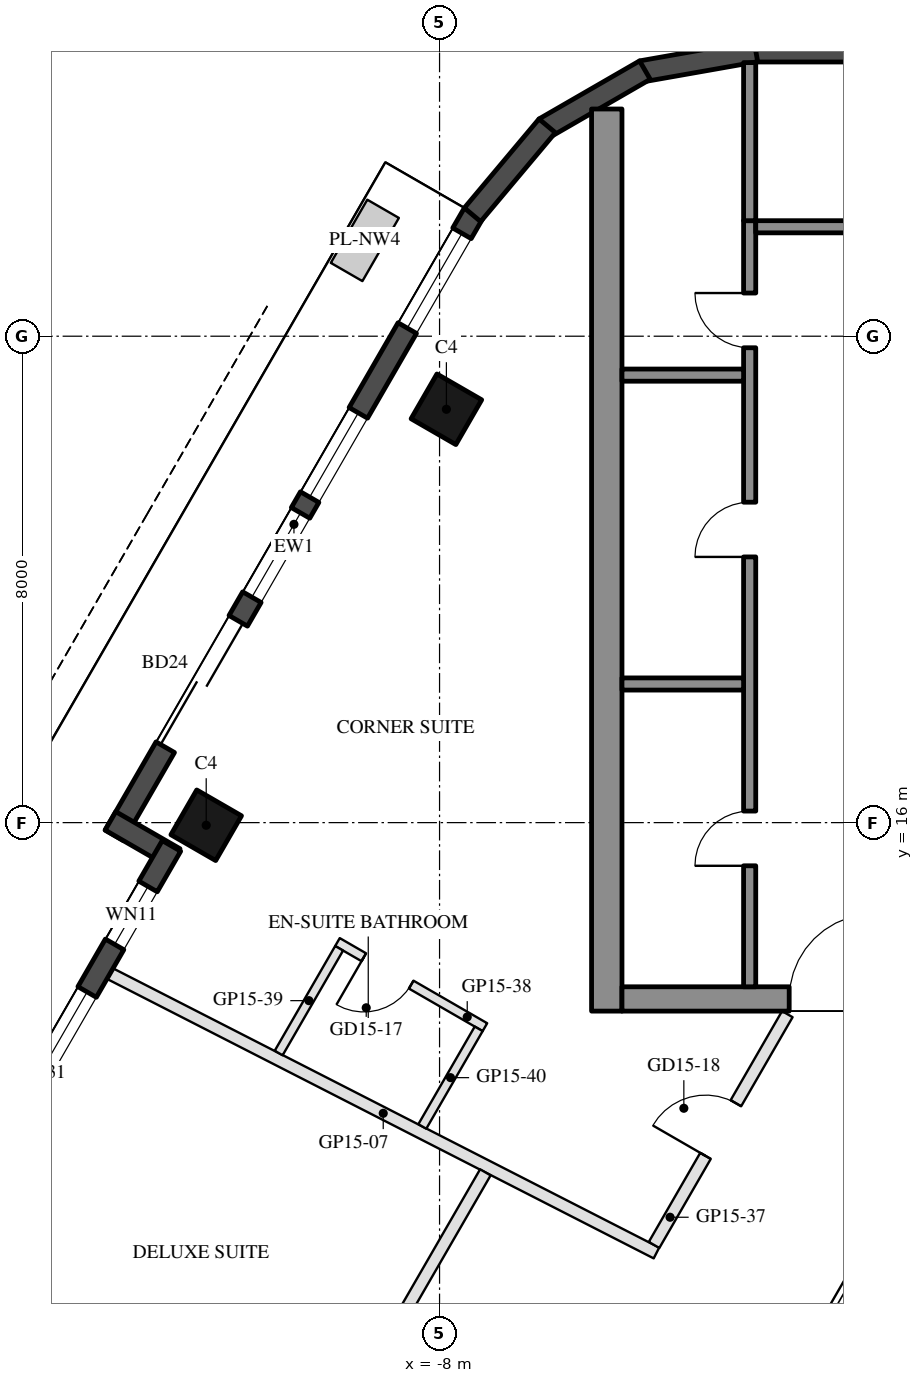
"""IFC4 building model, lengths in metres.
Left out: names, types, materials, properties, quantities, classifications, styles, units other than length and angle.
Written with IfcOpenShell. Run it as: python <this file> out.ifc"""

import sys

from ifc_helpers import new_model, si_unit, direction, frame, frame_2d, origin, origin_2d, place, context, subcontext, project, spatial, rectangle, hollow_rectangle, extrude, element, fill, save


model = new_model("IFC4")
c1 = context("Model", 3, precision=1e-05, world=origin(), true_north=direction((0.0, 1.0)))
c2 = subcontext(c1, "Body", "Model", "MODEL_VIEW")
j1 = project(units=[si_unit("LENGTHUNIT", "METRE"), si_unit("PLANEANGLEUNIT", "RADIAN")], contexts=[c1])
p1 = place(None, origin())
s1 = spatial("IfcSite", under=j1, at=p1, CompositionType="ELEMENT")
p2 = place(p1, origin())
s2 = spatial("IfcBuilding", under=s1, at=p2, CompositionType="ELEMENT")
p3 = place(p2, frame((0.0, 0.0, 172.5)))
s3 = spatial("IfcBuildingStorey", under=s2, at=p3, CompositionType="ELEMENT", Elevation=172.5)
for number, where, z_axis, x_axis in (
    (1, (-7.888, 22.798, 0.0), (0.0, 0.0, 1.0), (0.5, 0.866, 0.0)),
    (2, (-11.838, 15.957, 0.0), (0.0, 0.0, 1.0), (0.5, 0.866, 0.0)),
):
    element("IfcColumn", number, at=place(p3, frame(where, z_axis=z_axis, x_axis=x_axis)), inside=s3, PredefinedType="COLUMN", context=c2, shape_type="SweptSolid", body=[
        extrude(hollow_rectangle(XDim=0.85, YDim=0.85, WallThickness=0.04, at=origin_2d()), origin(), (0.0, 0.0, 1.0), 3.7),
    ])
p4 = place(p3, frame((-7.441, 26.022, 0.0), z_axis=(0.0, 0.0, 1.0), x_axis=(-0.499992533062, -0.86602971478, 0.0)))
e3 = element("IfcWall", 3, at=p4, inside=s3, PredefinedType="SOLIDWALL", context=c2, shape_type="SweptSolid", body=[
    extrude(rectangle(XDim=11.816, YDim=0.35, at=frame_2d((5.908, 0.0))), origin(), (0.0, 0.0, 1.0), 3.55),
])
p5 = place(p4, frame((0.381, 0.0, 0.3)))
e4 = element("IfcOpeningElement", 4, at=p5, cuts=e3, PredefinedType="OPENING", context=c2, shape_type="SweptSolid", body=[
    extrude(rectangle(XDim=1.8, YDim=2.65, at=frame_2d((0.9, 1.325))), frame((0.0, 0.185, 0.0), z_axis=(0.0, -1.0, 0.0), x_axis=(1.0, 0.0, 0.0)), (0.0, 0.0, 1.0), 0.37),
])
p6 = place(p4, frame((7.74, 0.0, 0.0)))
e5 = element("IfcOpeningElement", 5, at=p6, cuts=e3, PredefinedType="OPENING", context=c2, shape_type="SweptSolid", body=[
    extrude(rectangle(XDim=2.4, YDim=2.4, at=frame_2d((1.2, 1.2))), frame((0.0, 0.185, 0.0), z_axis=(0.0, -1.0, 0.0), x_axis=(1.0, 0.0, 0.0)), (0.0, 0.0, 1.0), 0.37),
])
p7 = place(p4, frame((3.791, 0.0, 0.3)))
e6 = element("IfcOpeningElement", 6, at=p7, cuts=e3, PredefinedType="OPENING", context=c2, shape_type="SweptSolid", body=[
    extrude(rectangle(XDim=1.6, YDim=2.65, at=frame_2d((0.8, 1.325))), frame((0.0, 0.185, 0.0), z_axis=(0.0, -1.0, 0.0), x_axis=(1.0, 0.0, 0.0)), (0.0, 0.0, 1.0), 0.37),
])
p8 = place(p4, frame((5.691, 0.0, 0.3)))
e7 = element("IfcOpeningElement", 7, at=p8, cuts=e3, PredefinedType="OPENING", context=c2, shape_type="SweptSolid", body=[
    extrude(rectangle(XDim=1.6, YDim=2.65, at=frame_2d((0.8, 1.325))), frame((0.0, 0.185, 0.0), z_axis=(0.0, -1.0, 0.0), x_axis=(1.0, 0.0, 0.0)), (0.0, 0.0, 1.0), 0.37),
])
p9 = place(p3, frame((-13.413, 16.029, 0.0), z_axis=(0.0, 0.0, 1.0), x_axis=(0.866005645448, -0.500034220881, 0.0)))
e8 = element("IfcWall", 8, at=p9, inside=s3, PredefinedType="SOLIDWALL", context=c2, shape_type="SweptSolid", body=[
    extrude(rectangle(XDim=1.22, YDim=0.35, at=frame_2d((0.61, 0.0))), origin(), (0.0, 0.0, 1.0), 3.55),
])
p10 = place(p3, frame((-12.409, 15.617, 0.0), z_axis=(0.0, 0.0, 1.0), x_axis=(-0.500003597184, -0.866023326939, 0.0)))
e9 = element("IfcWall", 9, at=p10, inside=s3, PredefinedType="SOLIDWALL", context=c2, shape_type="SweptSolid", body=[
    extrude(rectangle(XDim=6.74, YDim=0.35, at=frame_2d((3.37, 0.0))), origin(), (0.0, 0.0, 1.0), 3.55),
])
p11 = place(p10, frame((0.77, 0.0, 0.3)))
e10 = element("IfcOpeningElement", 10, at=p11, cuts=e9, PredefinedType="OPENING", context=c2, shape_type="SweptSolid", body=[
    extrude(rectangle(XDim=1.1, YDim=2.65, at=frame_2d((0.55, 1.325))), frame((0.0, 0.185, 0.0), z_axis=(0.0, -1.0, 0.0), x_axis=(1.0, 0.0, 0.0)), (0.0, 0.0, 1.0), 0.37),
])
p12 = place(p10, frame((2.774, 0.0, 0.3)))
e11 = element("IfcOpeningElement", 11, at=p12, cuts=e9, PredefinedType="OPENING", context=c2, shape_type="SweptSolid", body=[
    extrude(rectangle(XDim=3.1, YDim=2.65, at=frame_2d((1.55, 1.325))), frame((0.0, 0.185, 0.0), z_axis=(0.0, -1.0, 0.0), x_axis=(1.0, 0.0, 0.0)), (0.0, 0.0, 1.0), 0.37),
])
p13 = place(p3, frame((2.829, 28.685, 0.0), z_axis=(0.0, 0.0, 1.0), x_axis=(-1.0, 0.0, 0.0)))
e12 = element("IfcWall", 12, at=p13, inside=s3, PredefinedType="SOLIDWALL", context=c2, shape_type="SweptSolid", body=[
    extrude(rectangle(XDim=5.658, YDim=0.35, at=frame_2d((2.829, 0.0))), origin(), (0.0, 0.0, 1.0), 3.55),
])
for number, where, z_axis, x_axis in (
    (13, (-2.799, 28.688, 0.0), (0.0, 0.0, 1.0), (-0.985, -0.174, 0.0)),
    (14, (-4.623, 28.377, 0.0), (0.0, 0.0, 1.0), (-0.866, -0.5, 0.0)),
):
    element("IfcWall", number, at=place(p3, frame(where, z_axis=z_axis, x_axis=x_axis)), inside=s3, PredefinedType="SOLIDWALL", context=c2, shape_type="SweptSolid", body=[
        extrude(rectangle(XDim=1.91, YDim=0.35, at=frame_2d((0.955, 0.0))), origin(), (0.0, 0.0, 1.0), 3.55),
    ])
p14 = place(p3, frame((-6.23, 27.461, 0.0), z_axis=(0.0, 0.0, 1.0), x_axis=(-0.642808304945, -0.766027077259, 0.0)))
e15 = element("IfcWall", 15, at=p14, inside=s3, PredefinedType="SOLIDWALL", context=c2, shape_type="SweptSolid", body=[
    extrude(rectangle(XDim=1.91, YDim=0.35, at=frame_2d((0.955, 0.0))), origin(), (0.0, 0.0, 1.0), 3.55),
])
p15 = place(p3, frame((-5.25, 12.9, 0.0), z_axis=(0.0, 0.0, 1.0), x_axis=(0.0, 1.0, 0.0)))
e16 = element("IfcWall", 16, at=p15, inside=s3, PredefinedType="SHEAR", context=c2, shape_type="SweptSolid", body=[
    extrude(rectangle(XDim=14.837, YDim=0.5, at=frame_2d((7.418, 0.0))), origin(), (0.0, 0.0, 1.0), 3.5),
])
p16 = place(p3, frame((5.0, 13.1, 0.0), z_axis=(0.0, 0.0, 1.0), x_axis=(-1.0, 0.0, 0.0)))
e17 = element("IfcWall", 17, at=p16, inside=s3, PredefinedType="SHEAR", context=c2, shape_type="SweptSolid", body=[
    extrude(rectangle(XDim=10.0, YDim=0.4, at=frame_2d((5.0, 0.0))), origin(), (0.0, 0.0, 1.0), 3.5),
])
p17 = place(p16, frame((3.55, 0.0, 0.0)))
e18 = element("IfcOpeningElement", 18, at=p17, cuts=e17, PredefinedType="OPENING", context=c2, shape_type="SweptSolid", body=[
    extrude(rectangle(XDim=1.1, YDim=2.1, at=frame_2d((0.55, 1.05))), frame((0.0, 0.21, 0.0), z_axis=(0.0, -1.0, 0.0), x_axis=(1.0, 0.0, 0.0)), (0.0, 0.0, 1.0), 0.42),
])
p18 = place(p16, frame((5.85, 0.0, 0.0)))
e19 = element("IfcOpeningElement", 19, at=p18, cuts=e17, PredefinedType="OPENING", context=c2, shape_type="SweptSolid", body=[
    extrude(rectangle(XDim=1.4, YDim=2.1, at=frame_2d((0.7, 1.05))), frame((0.0, 0.21, 0.0), z_axis=(0.0, -1.0, 0.0), x_axis=(1.0, 0.0, 0.0)), (0.0, 0.0, 1.0), 0.42),
])
p19 = place(p3, frame((-2.9, 13.3, 0.0), z_axis=(0.0, 0.0, 1.0), x_axis=(0.0, 1.0, 0.0)))
e20 = element("IfcWall", 20, at=p19, inside=s3, PredefinedType="SHEAR", context=c2, shape_type="SweptSolid", body=[
    extrude(rectangle(XDim=12.6, YDim=0.2, at=frame_2d((6.3, 0.0))), origin(), (0.0, 0.0, 1.0), 3.5),
])
p20 = place(p19, frame((1.99, 0.0, 0.0)))
e21 = element("IfcOpeningElement", 21, at=p20, cuts=e20, PredefinedType="OPENING", context=c2, shape_type="SweptSolid", body=[
    extrude(rectangle(XDim=0.9, YDim=2.1, at=frame_2d((0.45, 1.05))), frame((0.0, 0.11, 0.0), z_axis=(0.0, -1.0, 0.0), x_axis=(1.0, 0.0, 0.0)), (0.0, 0.0, 1.0), 0.22),
])
p21 = place(p19, frame((7.07, 0.0, 0.0)))
e22 = element("IfcOpeningElement", 22, at=p21, cuts=e20, PredefinedType="OPENING", context=c2, shape_type="SweptSolid", body=[
    extrude(rectangle(XDim=0.9, YDim=2.1, at=frame_2d((0.45, 1.05))), frame((0.0, 0.11, 0.0), z_axis=(0.0, -1.0, 0.0), x_axis=(1.0, 0.0, 0.0)), (0.0, 0.0, 1.0), 0.22),
])
p22 = place(p19, frame((10.51, 0.0, 0.0)))
e23 = element("IfcOpeningElement", 23, at=p22, cuts=e20, PredefinedType="OPENING", context=c2, shape_type="SweptSolid", body=[
    extrude(rectangle(XDim=0.9, YDim=2.1, at=frame_2d((0.45, 1.05))), frame((0.0, 0.11, 0.0), z_axis=(0.0, -1.0, 0.0), x_axis=(1.0, 0.0, 0.0)), (0.0, 0.0, 1.0), 0.22),
])
p23 = place(p3, frame((-0.4, 25.8, 0.0), z_axis=(0.0, 0.0, 1.0), x_axis=(-1.0, 0.0, 0.0)))
e24 = element("IfcWall", 24, at=p23, inside=s3, PredefinedType="SHEAR", context=c2, shape_type="SweptSolid", body=[
    extrude(rectangle(XDim=2.4, YDim=0.2, at=frame_2d((1.2, 0.0))), origin(), (0.0, 0.0, 1.0), 3.5),
])
for number, where, z_axis, x_axis in (
    (25, (-3.0, 18.28, 0.0), (0.0, 0.0, 1.0), (-1.0, 0.0, 0.0)),
    (26, (-3.0, 23.36, 0.0), (0.0, 0.0, 1.0), (-1.0, 0.0, 0.0)),
):
    element("IfcWall", number, at=place(p3, frame(where, z_axis=z_axis, x_axis=x_axis)), inside=s3, PredefinedType="SHEAR", context=c2, shape_type="SweptSolid", body=[
        extrude(rectangle(XDim=2.0, YDim=0.2, at=frame_2d((1.0, 0.0))), origin(), (0.0, 0.0, 1.0), 3.5),
    ])
p24 = place(p3, frame((-2.9, 25.9, 0.0), z_axis=(0.0, 0.0, 1.0), x_axis=(0.0, 1.0, 0.0)))
e27 = element("IfcWall", 27, at=p24, inside=s3, PredefinedType="SHEAR", context=c2, shape_type="SweptSolid", body=[
    extrude(rectangle(XDim=2.6, YDim=0.2, at=frame_2d((1.3, 0.0))), origin(), (0.0, 0.0, 1.0), 3.5),
])
p25 = place(p3, frame((-13.42, 13.517, 0.0), z_axis=(0.0, 0.0, 1.0), x_axis=(0.890385665103, -0.455206950056, 0.0)))
e28 = element("IfcWall", 28, at=p25, inside=s3, PredefinedType="PARTITIONING", context=c2, shape_type="SweptSolid", body=[
    extrude(rectangle(XDim=10.093, YDim=0.2, at=frame_2d((5.047, 0.0))), origin(), (0.0, 0.0, 1.0), 3.06),
])
p26 = place(p3, frame((-4.472, 9.054, 0.0), z_axis=(0.0, 0.0, 1.0), x_axis=(0.499973180286, 0.8660408876, 0.0)))
e29 = element("IfcWall", 29, at=p26, inside=s3, PredefinedType="PARTITIONING", context=c2, shape_type="SweptSolid", body=[
    extrude(rectangle(XDim=4.383, YDim=0.2, at=frame_2d((2.191, 0.0))), origin(), (0.0, 0.0, 1.0), 2.95),
])
p27 = place(p26, frame((1.691, 0.0, 0.0)))
e30 = element("IfcOpeningElement", 30, at=p27, cuts=e29, PredefinedType="OPENING", context=c2, shape_type="SweptSolid", body=[
    extrude(rectangle(XDim=1.0, YDim=2.1, at=frame_2d((0.5, 1.05))), frame((0.0, 0.11, 0.0), z_axis=(0.0, -1.0, 0.0), x_axis=(1.0, 0.0, 0.0)), (0.0, 0.0, 1.0), 0.22),
])
p28 = place(p3, frame((-7.254, 12.636, 0.0), z_axis=(0.0, 0.0, 1.0), x_axis=(-0.865996816683, 0.500049511043, 0.0)))
e31 = element("IfcWall", 31, at=p28, inside=s3, PredefinedType="PARTITIONING", context=c2, shape_type="SweptSolid", body=[
    extrude(rectangle(XDim=2.8, YDim=0.15, at=frame_2d((1.4, 0.0))), origin(), (0.0, 0.0, 1.0), 3.55),
])
p29 = place(p28, frame((1.4, 0.0, 0.0)))
e32 = element("IfcOpeningElement", 32, at=p29, cuts=e31, PredefinedType="OPENING", context=c2, shape_type="SweptSolid", body=[
    extrude(rectangle(XDim=0.9, YDim=2.1, at=frame_2d((0.45, 1.05))), frame((0.0, 0.085, 0.0), z_axis=(0.0, -1.0, 0.0), x_axis=(1.0, 0.0, 0.0)), (0.0, 0.0, 1.0), 0.17),
])
p30 = place(p3, frame((-9.651, 13.933, 0.0), z_axis=(0.0, 0.0, 1.0), x_axis=(-0.50001992892, -0.866013897511, 0.0)))
e33 = element("IfcWall", 33, at=p30, inside=s3, PredefinedType="PARTITIONING", context=c2, shape_type="SweptSolid", body=[
    extrude(rectangle(XDim=1.989, YDim=0.15, at=frame_2d((0.995, 0.0))), origin(), (0.0, 0.0, 1.0), 3.55),
])
p31 = place(p3, frame((-7.356, 12.608, 0.0), z_axis=(0.0, 0.0, 1.0), x_axis=(-0.499935264145, -0.866062775822, 0.0)))
e34 = element("IfcWall", 34, at=p31, inside=s3, PredefinedType="PARTITIONING", context=c2, shape_type="SweptSolid", body=[
    extrude(rectangle(XDim=1.854, YDim=0.15, at=frame_2d((0.927, 0.0))), origin(), (0.0, 0.0, 1.0), 3.55),
])
p32 = place(p3, frame((-12.873, 0.504, 0.0), z_axis=(0.0, 0.0, 1.0), x_axis=(0.500019832059, 0.866013953437, 0.0)))
e35 = element("IfcWall", 35, at=p32, inside=s3, PredefinedType="PARTITIONING", context=c2, shape_type="SweptSolid", body=[
    extrude(rectangle(XDim=11.252, YDim=0.2, at=frame_2d((5.626, 0.0))), origin(), (0.0, 0.0, 1.0), 2.95),
])
p33 = place(p32, frame((2.45, 0.0, 0.0)))
e36 = element("IfcOpeningElement", 36, at=p33, cuts=e35, PredefinedType="OPENING", context=c2, shape_type="SweptSolid", body=[
    extrude(rectangle(XDim=1.0, YDim=2.1, at=frame_2d((0.5, 1.05))), frame((0.0, 0.11, 0.0), z_axis=(0.0, -1.0, 0.0), x_axis=(1.0, 0.0, 0.0)), (0.0, 0.0, 1.0), 0.22),
])
p34 = place(p5, origin())
e37 = element("IfcWindow", 37, at=p34, inside=s3, PartitioningType="SINGLE_PANEL", PredefinedType="WINDOW", context=c2, shape_type="SweptSolid", body=[
    extrude(rectangle(XDim=1.8, YDim=2.65, at=frame_2d((0.9, 1.325))), frame((0.0, 0.03, 0.0), z_axis=(0.0, -1.0, 0.0), x_axis=(1.0, 0.0, 0.0)), (0.0, 0.0, 1.0), 0.06),
])
fill(e4, e37)
p35 = place(p6, frame((2.4, 0.0, 0.0), z_axis=(0.0, 0.0, 1.0), x_axis=(-1.0, 0.0, 0.0)))
e38 = element("IfcDoor", 38, at=p35, inside=s3, OperationType="SLIDING_TO_LEFT", PredefinedType="DOOR", context=c2, shape_type="SweptSolid", body=[
    extrude(rectangle(XDim=2.4, YDim=2.4, at=frame_2d((1.2, 1.2))), frame((0.0, 0.025, 0.0), z_axis=(0.0, -1.0, 0.0), x_axis=(1.0, 0.0, 0.0)), (0.0, 0.0, 1.0), 0.05),
])
fill(e5, e38)
p36 = place(p7, origin())
e39 = element("IfcWindow", 39, at=p36, inside=s3, PartitioningType="SINGLE_PANEL", PredefinedType="WINDOW", context=c2, shape_type="SweptSolid", body=[
    extrude(rectangle(XDim=1.6, YDim=2.65, at=frame_2d((0.8, 1.325))), frame((0.0, 0.03, 0.0), z_axis=(0.0, -1.0, 0.0), x_axis=(1.0, 0.0, 0.0)), (0.0, 0.0, 1.0), 0.06),
])
fill(e6, e39)
p37 = place(p8, origin())
e40 = element("IfcWindow", 40, at=p37, inside=s3, PartitioningType="SINGLE_PANEL", PredefinedType="WINDOW", context=c2, shape_type="SweptSolid", body=[
    extrude(rectangle(XDim=1.6, YDim=2.65, at=frame_2d((0.8, 1.325))), frame((0.0, 0.03, 0.0), z_axis=(0.0, -1.0, 0.0), x_axis=(1.0, 0.0, 0.0)), (0.0, 0.0, 1.0), 0.06),
])
fill(e7, e40)
p38 = place(p11, origin())
e41 = element("IfcWindow", 41, at=p38, inside=s3, PartitioningType="SINGLE_PANEL", PredefinedType="WINDOW", context=c2, shape_type="SweptSolid", body=[
    extrude(rectangle(XDim=1.1, YDim=2.65, at=frame_2d((0.55, 1.325))), frame((0.0, 0.03, 0.0), z_axis=(0.0, -1.0, 0.0), x_axis=(1.0, 0.0, 0.0)), (0.0, 0.0, 1.0), 0.06),
])
fill(e10, e41)
p39 = place(p12, origin())
e42 = element("IfcWindow", 42, at=p39, inside=s3, PartitioningType="SINGLE_PANEL", PredefinedType="WINDOW", context=c2, shape_type="SweptSolid", body=[
    extrude(rectangle(XDim=3.1, YDim=2.65, at=frame_2d((1.55, 1.325))), frame((0.0, 0.03, 0.0), z_axis=(0.0, -1.0, 0.0), x_axis=(1.0, 0.0, 0.0)), (0.0, 0.0, 1.0), 0.06),
])
fill(e11, e42)
p40 = place(p20, origin())
e43 = element("IfcDoor", 43, at=p40, inside=s3, OperationType="SINGLE_SWING_LEFT", PredefinedType="DOOR", context=c2, shape_type="SweptSolid", body=[
    extrude(rectangle(XDim=0.9, YDim=2.1, at=frame_2d((0.45, 1.05))), frame((0.0, 0.025, 0.0), z_axis=(0.0, -1.0, 0.0), x_axis=(1.0, 0.0, 0.0)), (0.0, 0.0, 1.0), 0.05),
])
fill(e21, e43)
p41 = place(p21, origin())
e44 = element("IfcDoor", 44, at=p41, inside=s3, OperationType="SINGLE_SWING_LEFT", PredefinedType="DOOR", context=c2, shape_type="SweptSolid", body=[
    extrude(rectangle(XDim=0.9, YDim=2.1, at=frame_2d((0.45, 1.05))), frame((0.0, 0.025, 0.0), z_axis=(0.0, -1.0, 0.0), x_axis=(1.0, 0.0, 0.0)), (0.0, 0.0, 1.0), 0.05),
])
fill(e22, e44)
p42 = place(p22, origin())
e45 = element("IfcDoor", 45, at=p42, inside=s3, OperationType="SINGLE_SWING_RIGHT", PredefinedType="DOOR", context=c2, shape_type="SweptSolid", body=[
    extrude(rectangle(XDim=0.9, YDim=2.1, at=frame_2d((0.45, 1.05))), frame((0.0, 0.025, 0.0), z_axis=(0.0, -1.0, 0.0), x_axis=(1.0, 0.0, 0.0)), (0.0, 0.0, 1.0), 0.05),
])
fill(e23, e45)
p43 = place(p18, frame((1.4, 0.0, 0.0), z_axis=(0.0, 0.0, 1.0), x_axis=(-1.0, 0.0, 0.0)))
e46 = element("IfcDoor", 46, at=p43, inside=s3, OperationType="DOUBLE_DOOR_SINGLE_SWING", PredefinedType="DOOR", context=c2, shape_type="SweptSolid", body=[
    extrude(rectangle(XDim=1.4, YDim=2.1, at=frame_2d((0.7, 1.05))), frame((0.0, 0.025, 0.0), z_axis=(0.0, -1.0, 0.0), x_axis=(1.0, 0.0, 0.0)), (0.0, 0.0, 1.0), 0.05),
])
fill(e19, e46)
p44 = place(p29, origin())
e47 = element("IfcDoor", 47, at=p44, inside=s3, OperationType="SINGLE_SWING_RIGHT", PredefinedType="DOOR", context=c2, shape_type="SweptSolid", body=[
    extrude(rectangle(XDim=0.9, YDim=2.1, at=frame_2d((0.45, 1.05))), frame((0.0, 0.025, 0.0), z_axis=(0.0, -1.0, 0.0), x_axis=(1.0, 0.0, 0.0)), (0.0, 0.0, 1.0), 0.05),
])
fill(e32, e47)
p45 = place(p27, origin())
e48 = element("IfcDoor", 48, at=p45, inside=s3, OperationType="SINGLE_SWING_LEFT", PredefinedType="DOOR", context=c2, shape_type="SweptSolid", body=[
    extrude(rectangle(XDim=1.0, YDim=2.1, at=frame_2d((0.5, 1.05))), frame((0.0, 0.025, 0.0), z_axis=(0.0, -1.0, 0.0), x_axis=(1.0, 0.0, 0.0)), (0.0, 0.0, 1.0), 0.05),
])
fill(e30, e48)
save(model, sys.argv[1])
